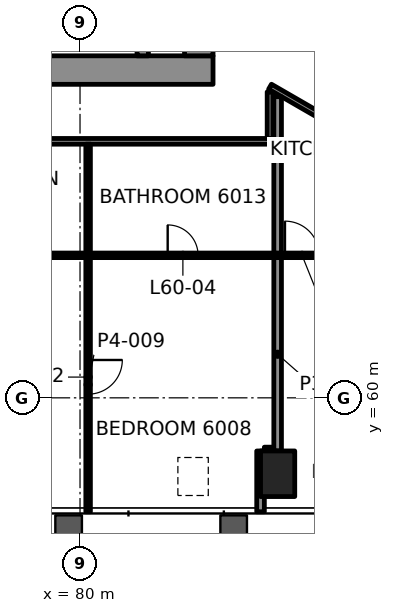
"""IFC4 building model, lengths in metres.
Left out: names, types, materials, properties, quantities, classifications, styles, units other than length and angle.
Written with IfcOpenShell. Run it as: python <this file> out.ifc"""

import sys

from ifc_helpers import new_model, si_unit, direction, frame, frame_2d, origin, origin_2d, place, context, subcontext, project, spatial, rectangle, hollow_rectangle, extrude, element, fill, save


model = new_model("IFC4")
c1 = context("Model", 3, precision=1e-05, world=origin(), true_north=direction((0.0, 1.0)))
c2 = subcontext(c1, "Body", "Model", "MODEL_VIEW")
j1 = project(units=[si_unit("LENGTHUNIT", "METRE"), si_unit("PLANEANGLEUNIT", "RADIAN")], contexts=[c1])
p1 = place(None, origin())
s1 = spatial("IfcSite", under=j1, at=p1, CompositionType="ELEMENT")
p2 = place(p1, origin())
s2 = spatial("IfcBuilding", under=s1, at=p2, CompositionType="ELEMENT")
p3 = place(p2, frame((0.0, 0.0, 256.6)))
s3 = spatial("IfcBuildingStorey", under=s2, at=p3, CompositionType="ELEMENT", Elevation=256.6)
p4 = place(p3, frame((85.2, 58.002, -0.0), z_axis=(0.0, 0.0, 1.0), x_axis=(1.0, 0.0, 0.0)))
e1 = element("IfcColumn", 1, at=p4, inside=s3, PredefinedType="COLUMN", context=c2, shape_type="SweptSolid", body=[
    extrude(hollow_rectangle(XDim=0.9, YDim=1.2, WallThickness=0.06, at=origin_2d()), origin(), (0.0, 0.0, 1.0), 3.5),
])
p5 = place(p3, frame((66.5, 68.625, 0.0), z_axis=(0.0, 0.0, 1.0), x_axis=(1.0, 0.0, 0.0)))
e2 = element("IfcWall", 2, at=p5, inside=s3, PredefinedType="SHEAR", context=c2, shape_type="SweptSolid", body=[
    extrude(rectangle(XDim=17.0, YDim=0.75, at=frame_2d((8.5, 0.0))), origin(), (0.0, 0.0, 1.0), 3.3),
])
p6 = place(p5, frame((1.9, 0.0, 0.0)))
e3 = element("IfcOpeningElement", 3, at=p6, cuts=e2, PredefinedType="OPENING", context=c2, shape_type="SweptSolid", body=[
    extrude(rectangle(XDim=0.9, YDim=2.1, at=frame_2d((0.45, 1.05))), frame((0.0, 0.385, 0.0), z_axis=(0.0, -1.0, 0.0), x_axis=(1.0, 0.0, 0.0)), (0.0, 0.0, 1.0), 0.77),
])
p7 = place(p3, frame((83.125, 69.0, 0.0), z_axis=(0.0, 0.0, 1.0), x_axis=(0.0, 1.0, 0.0)))
e4 = element("IfcWall", 4, at=p7, inside=s3, PredefinedType="SHEAR", context=c2, shape_type="SweptSolid", body=[
    extrude(rectangle(XDim=12.0, YDim=0.75, at=frame_2d((6.0, 0.0))), origin(), (0.0, 0.0, 1.0), 3.3),
])
p8 = place(p7, frame((3.4, 0.0, 0.0)))
e5 = element("IfcOpeningElement", 5, at=p8, cuts=e4, PredefinedType="OPENING", context=c2, shape_type="SweptSolid", body=[
    extrude(rectangle(XDim=1.8, YDim=2.1, at=frame_2d((0.9, 1.05))), frame((0.0, 0.385, 0.0), z_axis=(0.0, -1.0, 0.0), x_axis=(1.0, 0.0, 0.0)), (0.0, 0.0, 1.0), 0.77),
])
p9 = place(p3, frame((81.65, 69.0, 0.0), z_axis=(0.0, 0.0, 1.0), x_axis=(0.0, 1.0, 0.0)))
e6 = element("IfcWall", 6, at=p9, inside=s3, PredefinedType="SHEAR", context=c2, shape_type="SweptSolid", body=[
    extrude(rectangle(XDim=2.6, YDim=0.3, at=frame_2d((1.3, 0.0))), origin(), (0.0, 0.0, 1.0), 3.3),
])
p10 = place(p3, frame((84.851, 58.602, 0.0), z_axis=(0.0, 0.0, 1.0), x_axis=(1.0, 0.0, 0.0)))
e7 = element("IfcWall", 7, at=p10, inside=s3, PredefinedType="PARTITIONING", context=c2, shape_type="SweptSolid", body=[
    extrude(rectangle(XDim=0.249, YDim=0.2, at=frame_2d((0.125, 0.0))), origin(), (0.0, 0.0, 1.0), 2.7),
])
p11 = place(p3, frame((63.314, 63.75, 0.0), z_axis=(0.0, 0.0, 1.0), x_axis=(1.0, 0.0, 0.0)))
e8 = element("IfcWall", 8, at=p11, inside=s3, PredefinedType="PARTITIONING", context=c2, shape_type="SweptSolid", body=[
    extrude(rectangle(XDim=23.371, YDim=0.12, at=frame_2d((11.686, 0.0))), origin(), (0.0, 0.0, 1.0), 2.7),
])
p12 = place(p11, frame((1.372, 0.0, 0.0)))
e9 = element("IfcOpeningElement", 9, at=p12, cuts=e8, PredefinedType="OPENING", context=c2, shape_type="SweptSolid", body=[
    extrude(rectangle(XDim=0.8, YDim=2.1, at=frame_2d((0.4, 1.05))), frame((0.0, 0.07, 0.0), z_axis=(0.0, -1.0, 0.0), x_axis=(1.0, 0.0, 0.0)), (0.0, 0.0, 1.0), 0.14),
])
p13 = place(p11, frame((6.249, 0.0, 0.0)))
e10 = element("IfcOpeningElement", 10, at=p13, cuts=e8, PredefinedType="OPENING", context=c2, shape_type="SweptSolid", body=[
    extrude(rectangle(XDim=0.9, YDim=2.1, at=frame_2d((0.45, 1.05))), frame((0.0, 0.07, 0.0), z_axis=(0.0, -1.0, 0.0), x_axis=(1.0, 0.0, 0.0)), (0.0, 0.0, 1.0), 0.14),
])
p14 = place(p11, frame((12.595, 0.0, 0.0)))
e11 = element("IfcOpeningElement", 11, at=p14, cuts=e8, PredefinedType="OPENING", context=c2, shape_type="SweptSolid", body=[
    extrude(rectangle(XDim=0.9, YDim=2.1, at=frame_2d((0.45, 1.05))), frame((0.0, 0.07, 0.0), z_axis=(0.0, -1.0, 0.0), x_axis=(1.0, 0.0, 0.0)), (0.0, 0.0, 1.0), 0.14),
])
p15 = place(p11, frame((18.992, 0.0, 0.0)))
e12 = element("IfcOpeningElement", 12, at=p15, cuts=e8, PredefinedType="OPENING", context=c2, shape_type="SweptSolid", body=[
    extrude(rectangle(XDim=0.8, YDim=2.1, at=frame_2d((0.4, 1.05))), frame((0.0, 0.07, 0.0), z_axis=(0.0, -1.0, 0.0), x_axis=(1.0, 0.0, 0.0)), (0.0, 0.0, 1.0), 0.14),
])
p16 = place(p11, frame((22.078, 0.0, 0.0)))
e13 = element("IfcOpeningElement", 13, at=p16, cuts=e8, PredefinedType="OPENING", context=c2, shape_type="SweptSolid", body=[
    extrude(rectangle(XDim=0.9, YDim=2.1, at=frame_2d((0.45, 1.05))), frame((0.0, 0.07, 0.0), z_axis=(0.0, -1.0, 0.0), x_axis=(1.0, 0.0, 0.0)), (0.0, 0.0, 1.0), 0.14),
])
p17 = place(p3, frame((85.0, 66.75, 0.0), z_axis=(0.0, 0.0, 1.0), x_axis=(-1.0, 0.0, 0.0)))
e14 = element("IfcWall", 14, at=p17, inside=s3, PredefinedType="PARTITIONING", context=c2, shape_type="SweptSolid", body=[
    extrude(rectangle(XDim=20.0, YDim=0.15, at=frame_2d((10.0, 0.0))), origin(), (0.0, 0.0, 1.0), 2.7),
])
p18 = place(p17, frame((14.487, 0.0, 0.0)))
e15 = element("IfcOpeningElement", 15, at=p18, cuts=e14, PredefinedType="OPENING", context=c2, shape_type="SweptSolid", body=[
    extrude(rectangle(XDim=1.0, YDim=2.1, at=frame_2d((0.5, 1.05))), frame((0.0, 0.085, 0.0), z_axis=(0.0, -1.0, 0.0), x_axis=(1.0, 0.0, 0.0)), (0.0, 0.0, 1.0), 0.17),
])
p19 = place(p3, frame((85.2, 58.603, 0.0), z_axis=(0.0, 0.0, 1.0), x_axis=(0.0, 1.0, 0.0)))
e16 = element("IfcWall", 16, at=p19, inside=s3, PredefinedType="PARTITIONING", context=c2, shape_type="SweptSolid", body=[
    extrude(rectangle(XDim=5.087, YDim=0.2, at=frame_2d((2.544, 0.0))), origin(), (0.0, 0.0, 1.0), 2.7),
])
p20 = place(p3, frame((85.0, 66.825, 0.0), z_axis=(0.0, 0.0, 1.0), x_axis=(0.0, 1.0, 0.0)))
e17 = element("IfcWall", 17, at=p20, inside=s3, PredefinedType="PARTITIONING", context=c2, shape_type="SweptSolid", body=[
    extrude(rectangle(XDim=1.226, YDim=0.15, at=frame_2d((0.613, 0.0))), origin(), (0.0, 0.0, 1.0), 2.547),
])
p21 = place(p3, frame((84.75, 57.002, 0.0), z_axis=(0.0, 0.0, 1.0), x_axis=(0.0, 1.0, 0.0)))
e18 = element("IfcWall", 18, at=p21, inside=s3, PredefinedType="PARTITIONING", context=c2, shape_type="SweptSolid", body=[
    extrude(rectangle(XDim=1.599, YDim=0.2, at=frame_2d((0.8, 0.0))), origin(), (0.0, 0.0, 1.0), 2.688),
])
p22 = place(p3, frame((80.213, 63.69, 0.0), z_axis=(0.0, 0.0, 1.0), x_axis=(0.0, -1.0, 0.0)))
e19 = element("IfcWall", 19, at=p22, inside=s3, PredefinedType="PARTITIONING", context=c2, shape_type="SweptSolid", body=[
    extrude(rectangle(XDim=6.688, YDim=0.12, at=frame_2d((3.344, 0.0))), origin(), (0.0, 0.0, 1.0), 2.688),
])
p23 = place(p22, frame((2.694, 0.0, 0.0)))
e20 = element("IfcOpeningElement", 20, at=p23, cuts=e19, PredefinedType="OPENING", context=c2, shape_type="SweptSolid", body=[
    extrude(rectangle(XDim=0.9, YDim=2.1, at=frame_2d((0.45, 1.05))), frame((0.0, 0.07, 0.0), z_axis=(0.0, -1.0, 0.0), x_axis=(1.0, 0.0, 0.0)), (0.0, 0.0, 1.0), 0.14),
])
p24 = place(p3, frame((85.0, 70.266, 0.0), z_axis=(0.0, 0.0, 1.0), x_axis=(0.866021473228, -0.500006807861, 0.0)))
e21 = element("IfcWall", 21, at=p24, inside=s3, PredefinedType="PARTITIONING", context=c2, shape_type="SweptSolid", body=[
    extrude(rectangle(XDim=15.533, YDim=0.15, at=frame_2d((7.767, 0.0))), origin(), (0.0, 0.0, 1.0), 2.7),
])
p25 = place(p24, frame((9.029, 0.0, 0.0)))
e22 = element("IfcOpeningElement", 22, at=p25, cuts=e21, PredefinedType="OPENING", context=c2, shape_type="SweptSolid", body=[
    extrude(rectangle(XDim=1.0, YDim=2.1, at=frame_2d((0.5, 1.05))), frame((0.0, 0.085, 0.0), z_axis=(0.0, -1.0, 0.0), x_axis=(1.0, 0.0, 0.0)), (0.0, 0.0, 1.0), 0.17),
])
p26 = place(p3, frame((97.552, 60.94, 0.0), z_axis=(0.0, 0.0, 1.0), x_axis=(-0.866027660432, 0.499996091351, 0.0)))
e23 = element("IfcWall", 23, at=p26, inside=s3, PredefinedType="PARTITIONING", context=c2, shape_type="SweptSolid", body=[
    extrude(rectangle(XDim=14.494, YDim=0.15, at=frame_2d((7.247, 0.0))), origin(), (0.0, 0.0, 1.0), 2.547),
])
p27 = place(p26, frame((8.955, 0.0, 0.0)))
e24 = element("IfcOpeningElement", 24, at=p27, cuts=e23, PredefinedType="OPENING", context=c2, shape_type="SweptSolid", body=[
    extrude(rectangle(XDim=1.0, YDim=2.1, at=frame_2d((0.5, 1.05))), frame((0.0, 0.085, 0.0), z_axis=(0.0, -1.0, 0.0), x_axis=(1.0, 0.0, 0.0)), (0.0, 0.0, 1.0), 0.17),
])
p28 = place(p3, frame((85.2, 63.81, 0.0), z_axis=(0.0, 0.0, 1.0), x_axis=(0.0, 1.0, 0.0)))
e25 = element("IfcWall", 25, at=p28, inside=s3, PredefinedType="PARTITIONING", context=c2, shape_type="SweptSolid", body=[
    extrude(rectangle(XDim=4.115, YDim=0.2, at=frame_2d((2.058, 0.0))), origin(), (0.0, 0.0, 1.0), 2.547),
])
p29 = place(p3, frame((80.213, 63.81, 0.0), z_axis=(0.0, 0.0, 1.0), x_axis=(0.0, 1.0, 0.0)))
e26 = element("IfcWall", 26, at=p29, inside=s3, PredefinedType="PARTITIONING", context=c2, shape_type="SweptSolid", body=[
    extrude(rectangle(XDim=2.865, YDim=0.12, at=frame_2d((1.433, 0.0))), origin(), (0.0, 0.0, 1.0), 2.7),
])
p30 = place(p15, origin())
e27 = element("IfcDoor", 27, at=p30, inside=s3, OperationType="SINGLE_SWING_LEFT", PredefinedType="DOOR", context=c2, shape_type="SweptSolid", body=[
    extrude(rectangle(XDim=0.8, YDim=2.1, at=frame_2d((0.4, 1.05))), frame((0.0, 0.025, 0.0), z_axis=(0.0, -1.0, 0.0), x_axis=(1.0, 0.0, 0.0)), (0.0, 0.0, 1.0), 0.05),
])
fill(e12, e27)
p31 = place(p16, origin())
e28 = element("IfcDoor", 28, at=p31, inside=s3, OperationType="SINGLE_SWING_RIGHT", PredefinedType="DOOR", context=c2, shape_type="SweptSolid", body=[
    extrude(rectangle(XDim=0.9, YDim=2.1, at=frame_2d((0.45, 1.05))), frame((0.0, 0.025, 0.0), z_axis=(0.0, -1.0, 0.0), x_axis=(1.0, 0.0, 0.0)), (0.0, 0.0, 1.0), 0.05),
])
fill(e13, e28)
p32 = place(p23, origin())
e29 = element("IfcDoor", 29, at=p32, inside=s3, OperationType="SINGLE_SWING_LEFT", PredefinedType="DOOR", context=c2, shape_type="SweptSolid", body=[
    extrude(rectangle(XDim=0.9, YDim=2.1, at=frame_2d((0.45, 1.05))), frame((0.0, 0.025, 0.0), z_axis=(0.0, -1.0, 0.0), x_axis=(1.0, 0.0, 0.0)), (0.0, 0.0, 1.0), 0.05),
])
fill(e20, e29)
save(model, sys.argv[1])
